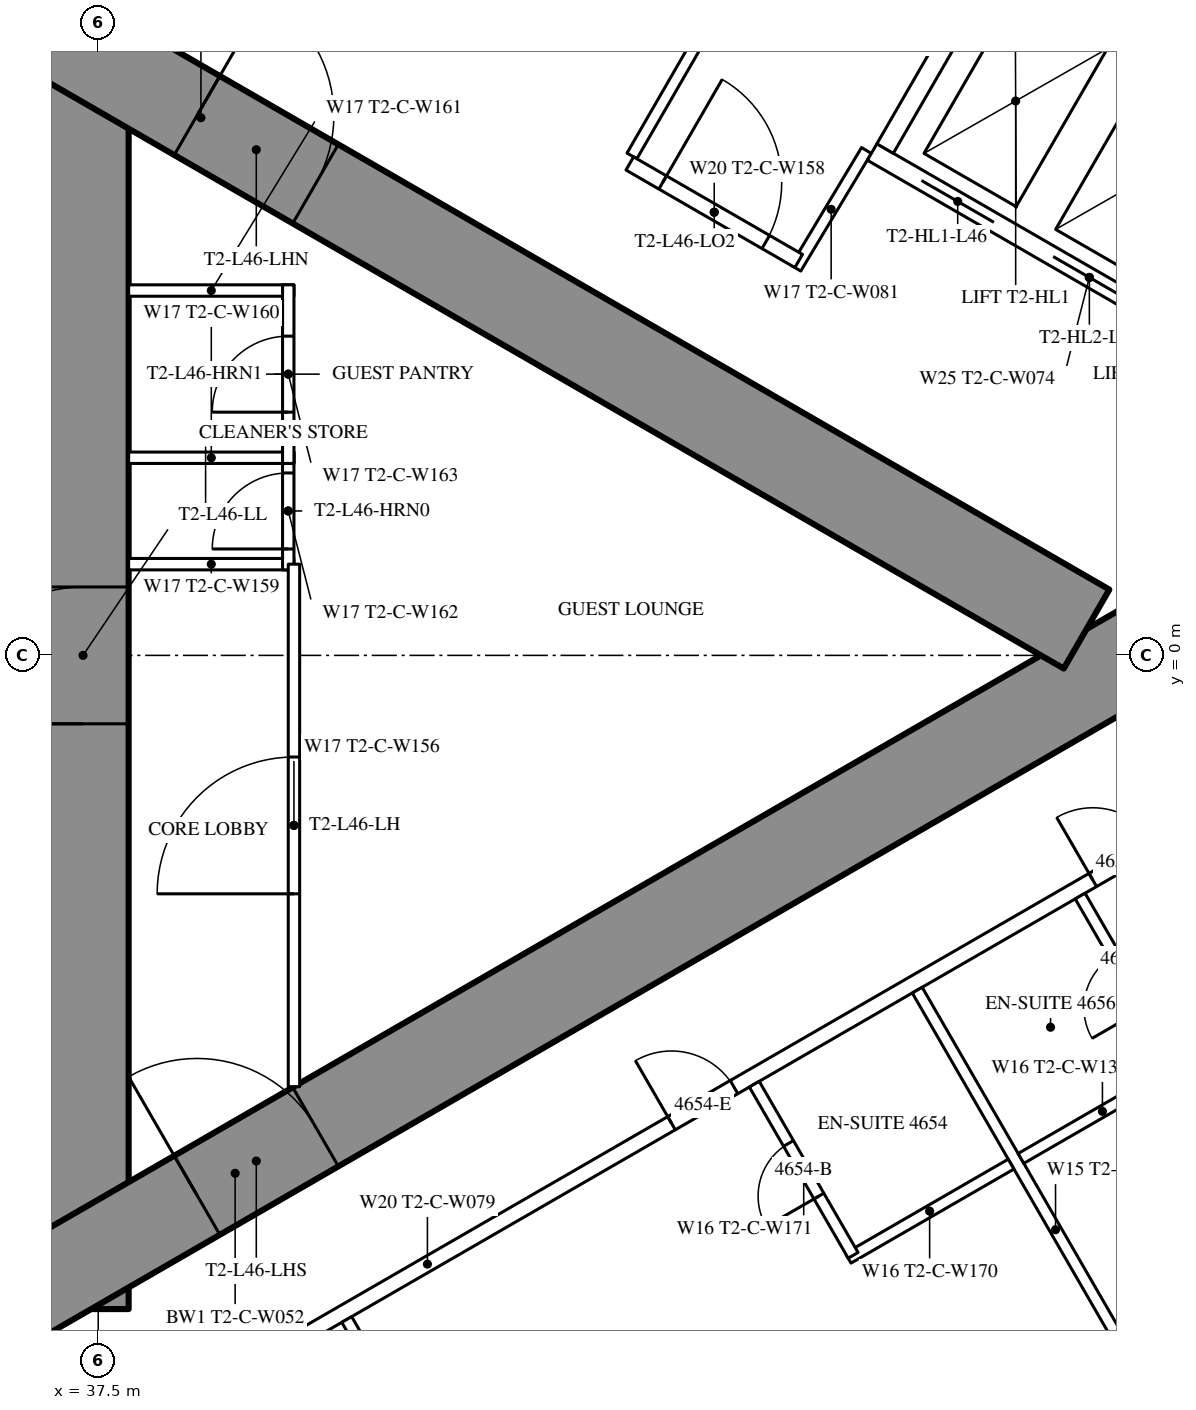
"""IFC4 building model, lengths in metres.
Left out: names, types, materials, properties, quantities, classifications, styles, units other than length and angle.
Written with IfcOpenShell. Run it as: python <this file> out.ifc"""

import sys

from ifc_helpers import new_model, si_unit, direction, frame, frame_2d, origin, place, context, subcontext, project, spatial, rectangle, extrude, element, fill, save


model = new_model("IFC4")
c1 = context("Model", 3, precision=1e-05, world=origin(), true_north=direction((0.0, 1.0)))
c2 = subcontext(c1, "Body", "Model", "MODEL_VIEW")
j1 = project(units=[si_unit("LENGTHUNIT", "METRE"), si_unit("PLANEANGLEUNIT", "RADIAN")], contexts=[c1])
p1 = place(None, origin())
s1 = spatial("IfcSite", under=j1, at=p1, CompositionType="ELEMENT")
p2 = place(p1, origin())
s2 = spatial("IfcBuilding", under=s1, at=p2, CompositionType="ELEMENT")
p3 = place(p2, frame((0.0, 0.0, 173.8)))
s3 = spatial("IfcBuildingStorey", under=s2, at=p3, CompositionType="ELEMENT", Elevation=173.8)
p4 = place(p3, frame((37.3, -8.6, 0.0), z_axis=(0.0, 0.0, 1.0), x_axis=(0.0, 1.0, 0.0)))
e1 = element("IfcWall", 1, at=p4, inside=s3, PredefinedType="SHEAR", context=c2, shape_type="SweptSolid", body=[
    extrude(rectangle(XDim=17.2, YDim=1.2, at=frame_2d((8.6, 0.0))), origin(), (0.0, 0.0, 1.0), 3.5),
])
p5 = place(p4, frame((7.7, 0.0, 0.0)))
e2 = element("IfcOpeningElement", 2, at=p5, cuts=e1, PredefinedType="OPENING", context=c2, shape_type="SweptSolid", body=[
    extrude(rectangle(XDim=1.8, YDim=2.2, at=frame_2d((0.9, 1.1))), frame((0.0, 0.61, 0.0), z_axis=(0.0, -1.0, 0.0), x_axis=(1.0, 0.0, 0.0)), (0.0, 0.0, 1.0), 1.22),
])
p6 = place(p3, frame((27.2, -13.8, 0.0), z_axis=(0.0, 0.0, 1.0), x_axis=(0.866027159892, 0.499996958321, 0.0)))
e3 = element("IfcWall", 3, at=p6, inside=s3, PredefinedType="SHEAR", context=c2, shape_type="SweptSolid", body=[
    extrude(rectangle(XDim=27.947, YDim=1.2, at=frame_2d((13.973, 0.0))), origin(), (0.0, 0.0, 1.0), 3.5),
])
p7 = place(p6, frame((4.6, 0.0, 0.0)))
e4 = element("IfcOpeningElement", 4, at=p7, cuts=e3, PredefinedType="OPENING", context=c2, shape_type="SweptSolid", body=[
    extrude(rectangle(XDim=1.0, YDim=2.2, at=frame_2d((0.5, 1.1))), frame((0.0, 0.61, 0.0), z_axis=(0.0, -1.0, 0.0), x_axis=(1.0, 0.0, 0.0)), (0.0, 0.0, 1.0), 1.22),
])
p8 = place(p6, frame((13.395, 0.0, 0.0)))
e5 = element("IfcOpeningElement", 5, at=p8, cuts=e3, PredefinedType="OPENING", context=c2, shape_type="SweptSolid", body=[
    extrude(rectangle(XDim=1.8, YDim=2.2, at=frame_2d((0.9, 1.1))), frame((0.0, 0.61, 0.0), z_axis=(0.0, -1.0, 0.0), x_axis=(1.0, 0.0, 0.0)), (0.0, 0.0, 1.0), 1.22),
])
p9 = place(p3, frame((27.2, 13.8, 0.0), z_axis=(0.0, 0.0, 1.0), x_axis=(0.866024515034, -0.500001539357, 0.0)))
e6 = element("IfcWall", 6, at=p9, inside=s3, PredefinedType="SHEAR", context=c2, shape_type="SweptSolid", body=[
    extrude(rectangle(XDim=26.907, YDim=1.2, at=frame_2d((13.454, 0.0))), origin(), (0.0, 0.0, 1.0), 3.5),
])
p10 = place(p9, frame((4.6, 0.0, 0.0)))
e7 = element("IfcOpeningElement", 7, at=p10, cuts=e6, PredefinedType="OPENING", context=c2, shape_type="SweptSolid", body=[
    extrude(rectangle(XDim=1.0, YDim=2.2, at=frame_2d((0.5, 1.1))), frame((0.0, 0.61, 0.0), z_axis=(0.0, -1.0, 0.0), x_axis=(1.0, 0.0, 0.0)), (0.0, 0.0, 1.0), 1.22),
])
p11 = place(p9, frame((13.395, 0.0, 0.0)))
e8 = element("IfcOpeningElement", 8, at=p11, cuts=e6, PredefinedType="OPENING", context=c2, shape_type="SweptSolid", body=[
    extrude(rectangle(XDim=1.8, YDim=2.2, at=frame_2d((0.9, 1.1))), frame((0.0, 0.61, 0.0), z_axis=(0.0, -1.0, 0.0), x_axis=(1.0, 0.0, 0.0)), (0.0, 0.0, 1.0), 1.22),
])
p12 = place(p3, frame((27.959, -16.017, 0.0), z_axis=(0.0, 0.0, 1.0), x_axis=(0.866024151371, 0.500002169237, 0.0)))
e9 = element("IfcWall", 9, at=p12, inside=s3, PredefinedType="PARTITIONING", context=c2, shape_type="SweptSolid", body=[
    extrude(rectangle(XDim=32.034, YDim=0.2, at=frame_2d((16.017, 0.0))), origin(), (0.0, 0.0, 1.0), 3.25),
])
p13 = place(p12, frame((4.765, 0.0, 0.0)))
e10 = element("IfcOpeningElement", 10, at=p13, cuts=e9, PredefinedType="OPENING", context=c2, shape_type="SweptSolid", body=[
    extrude(rectangle(XDim=0.95, YDim=2.2, at=frame_2d((0.475, 1.1))), frame((0.0, 0.11, 0.0), z_axis=(0.0, -1.0, 0.0), x_axis=(1.0, 0.0, 0.0)), (0.0, 0.0, 1.0), 0.22),
])
p14 = place(p12, frame((9.215, 0.0, 0.0)))
e11 = element("IfcOpeningElement", 11, at=p14, cuts=e9, PredefinedType="OPENING", context=c2, shape_type="SweptSolid", body=[
    extrude(rectangle(XDim=1.0, YDim=2.2, at=frame_2d((0.5, 1.1))), frame((0.0, 0.11, 0.0), z_axis=(0.0, -1.0, 0.0), x_axis=(1.0, 0.0, 0.0)), (0.0, 0.0, 1.0), 0.22),
])
p15 = place(p12, frame((19.725, 0.0, 0.0)))
e12 = element("IfcOpeningElement", 12, at=p15, cuts=e9, PredefinedType="OPENING", context=c2, shape_type="SweptSolid", body=[
    extrude(rectangle(XDim=0.95, YDim=2.2, at=frame_2d((0.475, 1.1))), frame((0.0, 0.11, 0.0), z_axis=(0.0, -1.0, 0.0), x_axis=(1.0, 0.0, 0.0)), (0.0, 0.0, 1.0), 0.22),
])
p16 = place(p12, frame((26.125, 0.0, 0.0)))
e13 = element("IfcOpeningElement", 13, at=p16, cuts=e9, PredefinedType="OPENING", context=c2, shape_type="SweptSolid", body=[
    extrude(rectangle(XDim=0.95, YDim=2.2, at=frame_2d((0.475, 1.1))), frame((0.0, 0.11, 0.0), z_axis=(0.0, -1.0, 0.0), x_axis=(1.0, 0.0, 0.0)), (0.0, 0.0, 1.0), 0.22),
])
p17 = place(p12, frame((28.106, 0.0, 0.0)))
e14 = element("IfcOpeningElement", 14, at=p17, cuts=e9, PredefinedType="OPENING", context=c2, shape_type="SweptSolid", body=[
    extrude(rectangle(XDim=0.95, YDim=2.2, at=frame_2d((0.475, 1.1))), frame((0.0, 0.11, 0.0), z_axis=(0.0, -1.0, 0.0), x_axis=(1.0, 0.0, 0.0)), (0.0, 0.0, 1.0), 0.22),
])
p18 = place(p3, frame((40.769, -8.737, 0.0), z_axis=(0.0, 0.0, 1.0), x_axis=(0.500013115284, -0.866017831539, 0.0)))
e15 = element("IfcWall", 15, at=p18, inside=s3, PredefinedType="PARTITIONING", context=c2, shape_type="SweptSolid", body=[
    extrude(rectangle(XDim=7.198, YDim=0.15, at=frame_2d((3.599, 0.0))), origin(), (0.0, 0.0, 1.0), 2.3),
])
p19 = place(p3, frame((48.275, -4.404, 0.0), z_axis=(0.0, 0.0, 1.0), x_axis=(0.500006004368, -0.866021937133, 0.0)))
e16 = element("IfcWall", 16, at=p19, inside=s3, PredefinedType="PARTITIONING", context=c2, shape_type="SweptSolid", body=[
    extrude(rectangle(XDim=7.279, YDim=0.15, at=frame_2d((3.64, 0.0))), origin(), (0.0, 0.0, 1.0), 2.3),
])
p20 = place(p3, frame((44.521, 6.571, 0.0), z_axis=(0.0, 0.0, 1.0), x_axis=(0.500020376429, 0.866013639128, 0.0)))
e17 = element("IfcWall", 17, at=p20, inside=s3, PredefinedType="PARTITIONING", context=c2, shape_type="SweptSolid", body=[
    extrude(rectangle(XDim=7.306, YDim=0.15, at=frame_2d((3.653, 0.0))), origin(), (0.0, 0.0, 1.0), 2.3),
])
p21 = place(p3, frame((47.606, 6.643, 0.0), z_axis=(0.0, 0.0, 1.0), x_axis=(-0.514237157483, -0.857648031458, 0.0)))
e18 = element("IfcWall", 18, at=p21, inside=s3, PredefinedType="PARTITIONING", context=c2, shape_type="SweptSolid", body=[
    extrude(rectangle(XDim=1.805, YDim=0.15, at=frame_2d((0.902, 0.0))), origin(), (0.0, 0.0, 1.0), 3.25),
])
p22 = place(p3, frame((44.493, 6.472, 0.0), z_axis=(0.0, 0.0, 1.0), x_axis=(0.866027140358, -0.499996992154, 0.0)))
e19 = element("IfcWall", 19, at=p22, inside=s3, PredefinedType="PARTITIONING", context=c2, shape_type="SweptSolid", body=[
    extrude(rectangle(XDim=2.566, YDim=0.2, at=frame_2d((1.283, 0.0))), origin(), (0.0, 0.0, 1.0), 3.25),
])
p23 = place(p22, frame((0.5, 0.0, 0.0)))
e20 = element("IfcOpeningElement", 20, at=p23, cuts=e19, PredefinedType="OPENING", context=c2, shape_type="SweptSolid", body=[
    extrude(rectangle(XDim=1.566, YDim=2.2, at=frame_2d((0.783, 1.1))), frame((0.0, 0.11, 0.0), z_axis=(0.0, -1.0, 0.0), x_axis=(1.0, 0.0, 0.0)), (0.0, 0.0, 1.0), 0.22),
])
p24 = place(p3, frame((47.366, -7.93, 0.0), z_axis=(0.0, 0.0, 1.0), x_axis=(0.866031185235, 0.4999899861, 0.0)))
e21 = element("IfcWall", 21, at=p24, inside=s3, PredefinedType="PARTITIONING", context=c2, shape_type="SweptSolid", body=[
    extrude(rectangle(XDim=2.475, YDim=0.15, at=frame_2d((1.238, 0.0))), origin(), (0.0, 0.0, 1.0), 3.25),
])
p25 = place(p3, frame((46.131, -5.641, 0.0), z_axis=(0.0, 0.0, 1.0), x_axis=(0.49997716683, -0.86603858612, 0.0)))
e22 = element("IfcWall", 22, at=p25, inside=s3, PredefinedType="PARTITIONING", context=c2, shape_type="SweptSolid", body=[
    extrude(rectangle(XDim=2.6, YDim=0.15, at=frame_2d((1.3, 0.0))), origin(), (0.0, 0.0, 1.0), 3.25),
])
p26 = place(p25, frame((0.9, 0.0, 0.0)))
e23 = element("IfcOpeningElement", 23, at=p26, cuts=e22, PredefinedType="OPENING", context=c2, shape_type="SweptSolid", body=[
    extrude(rectangle(XDim=0.8, YDim=2.2, at=frame_2d((0.4, 1.1))), frame((0.0, 0.085, 0.0), z_axis=(0.0, -1.0, 0.0), x_axis=(1.0, 0.0, 0.0)), (0.0, 0.0, 1.0), 0.17),
])
p27 = place(p3, frame((49.64, -6.618, 0.0), z_axis=(0.0, 0.0, 1.0), x_axis=(0.866006523861, 0.500032699561, 0.0)))
e24 = element("IfcWall", 24, at=p27, inside=s3, PredefinedType="PARTITIONING", context=c2, shape_type="SweptSolid", body=[
    extrude(rectangle(XDim=2.475, YDim=0.15, at=frame_2d((1.237, 0.0))), origin(), (0.0, 0.0, 1.0), 3.25),
])
p28 = place(p3, frame((50.418, -3.166, 0.0), z_axis=(0.0, 0.0, 1.0), x_axis=(0.499936506574, -0.866062058628, 0.0)))
e25 = element("IfcWall", 25, at=p28, inside=s3, PredefinedType="PARTITIONING", context=c2, shape_type="SweptSolid", body=[
    extrude(rectangle(XDim=2.6, YDim=0.15, at=frame_2d((1.3, 0.0))), origin(), (0.0, 0.0, 1.0), 3.25),
])
p29 = place(p28, frame((0.9, 0.0, 0.0)))
e26 = element("IfcOpeningElement", 26, at=p29, cuts=e25, PredefinedType="OPENING", context=c2, shape_type="SweptSolid", body=[
    extrude(rectangle(XDim=0.8, YDim=2.2, at=frame_2d((0.4, 1.1))), frame((0.0, 0.085, 0.0), z_axis=(0.0, -1.0, 0.0), x_axis=(1.0, 0.0, 0.0)), (0.0, 0.0, 1.0), 0.17),
])
for number, where, z_axis, x_axis in (
    (27, (37.9, 1.2, 0.0), (0.0, 0.0, 1.0), (1.0, 0.0, 0.0)),
    (28, (37.9, 2.6, 0.0), (0.0, 0.0, 1.0), (1.0, 0.0, 0.0)),
    (29, (37.9, 4.8, 0.0), (0.0, 0.0, 1.0), (1.0, 0.0, 0.0)),
):
    element("IfcWall", number, at=place(p3, frame(where, z_axis=z_axis, x_axis=x_axis)), inside=s3, PredefinedType="PARTITIONING", context=c2, shape_type="SweptSolid", body=[
        extrude(rectangle(XDim=2.175, YDim=0.15, at=frame_2d((1.087, 0.0))), origin(), (0.0, 0.0, 1.0), 3.25),
    ])
p30 = place(p3, frame((40.0, 1.125, 0.0), z_axis=(0.0, 0.0, 1.0), x_axis=(0.0, 1.0, 0.0)))
e30 = element("IfcWall", 30, at=p30, inside=s3, PredefinedType="PARTITIONING", context=c2, shape_type="SweptSolid", body=[
    extrude(rectangle(XDim=1.55, YDim=0.15, at=frame_2d((0.775, 0.0))), origin(), (0.0, 0.0, 1.0), 3.25),
])
p31 = place(p30, frame((0.275, 0.0, 0.0)))
e31 = element("IfcOpeningElement", 31, at=p31, cuts=e30, PredefinedType="OPENING", context=c2, shape_type="SweptSolid", body=[
    extrude(rectangle(XDim=1.0, YDim=2.2, at=frame_2d((0.5, 1.1))), frame((0.0, 0.085, 0.0), z_axis=(0.0, -1.0, 0.0), x_axis=(1.0, 0.0, 0.0)), (0.0, 0.0, 1.0), 0.17),
])
p32 = place(p3, frame((40.0, 2.525, 0.0), z_axis=(0.0, 0.0, 1.0), x_axis=(0.0, 1.0, 0.0)))
e32 = element("IfcWall", 32, at=p32, inside=s3, PredefinedType="PARTITIONING", context=c2, shape_type="SweptSolid", body=[
    extrude(rectangle(XDim=2.35, YDim=0.15, at=frame_2d((1.175, 0.0))), origin(), (0.0, 0.0, 1.0), 3.25),
])
p33 = place(p32, frame((0.675, 0.0, 0.0)))
e33 = element("IfcOpeningElement", 33, at=p33, cuts=e32, PredefinedType="OPENING", context=c2, shape_type="SweptSolid", body=[
    extrude(rectangle(XDim=1.0, YDim=2.2, at=frame_2d((0.5, 1.1))), frame((0.0, 0.085, 0.0), z_axis=(0.0, -1.0, 0.0), x_axis=(1.0, 0.0, 0.0)), (0.0, 0.0, 1.0), 0.17),
])
p34 = place(p3, frame((40.075, -5.674, 0.0), z_axis=(0.0, 0.0, 1.0), x_axis=(0.0, 1.0, 0.0)))
e34 = element("IfcWall", 34, at=p34, inside=s3, PredefinedType="PARTITIONING", context=c2, shape_type="SweptSolid", body=[
    extrude(rectangle(XDim=6.874, YDim=0.15, at=frame_2d((3.437, 0.0))), origin(), (0.0, 0.0, 1.0), 3.25),
])
p35 = place(p34, frame((2.537, 0.0, 0.0)))
e35 = element("IfcOpeningElement", 35, at=p35, cuts=e34, PredefinedType="OPENING", context=c2, shape_type="SweptSolid", body=[
    extrude(rectangle(XDim=1.8, YDim=2.2, at=frame_2d((0.9, 1.1))), frame((0.0, 0.085, 0.0), z_axis=(0.0, -1.0, 0.0), x_axis=(1.0, 0.0, 0.0)), (0.0, 0.0, 1.0), 0.17),
])
p36 = place(p3, frame((47.681, 6.622, 0.0), z_axis=(0.0, 0.0, 1.0), x_axis=(0.86603344179, -0.499986077507, 0.0)))
e36 = element("IfcWall", 36, at=p36, inside=s3, PredefinedType="PARTITIONING", context=c2, shape_type="SweptSolid", body=[
    extrude(rectangle(XDim=6.6, YDim=0.25, at=frame_2d((3.3, 0.0))), origin(), (0.0, 0.0, 1.0), 3.25),
])
p37 = place(p36, frame((0.75, 0.0, 0.0)))
e37 = element("IfcOpeningElement", 37, at=p37, cuts=e36, PredefinedType="OPENING", context=c2, shape_type="SweptSolid", body=[
    extrude(rectangle(XDim=1.1, YDim=2.2, at=frame_2d((0.55, 1.1))), frame((0.0, 0.135, 0.0), z_axis=(0.0, -1.0, 0.0), x_axis=(1.0, 0.0, 0.0)), (0.0, 0.0, 1.0), 0.27),
])
p38 = place(p36, frame((2.75, 0.0, 0.0)))
e38 = element("IfcOpeningElement", 38, at=p38, cuts=e36, PredefinedType="OPENING", context=c2, shape_type="SweptSolid", body=[
    extrude(rectangle(XDim=1.1, YDim=2.2, at=frame_2d((0.55, 1.1))), frame((0.0, 0.135, 0.0), z_axis=(0.0, -1.0, 0.0), x_axis=(1.0, 0.0, 0.0)), (0.0, 0.0, 1.0), 0.27),
])
p39 = place(p36, frame((4.75, 0.0, 0.0)))
e39 = element("IfcOpeningElement", 39, at=p39, cuts=e36, PredefinedType="OPENING", context=c2, shape_type="SweptSolid", body=[
    extrude(rectangle(XDim=1.1, YDim=2.2, at=frame_2d((0.55, 1.1))), frame((0.0, 0.135, 0.0), z_axis=(0.0, -1.0, 0.0), x_axis=(1.0, 0.0, 0.0)), (0.0, 0.0, 1.0), 0.27),
])
p40 = place(p3, frame((49.406, 9.611, 0.0), z_axis=(0.0, 0.0, 1.0), x_axis=(0.86603344179, -0.499986077507, 0.0)))
e40 = element("IfcWall", 40, at=p40, inside=s3, PredefinedType="PARTITIONING", context=c2, shape_type="SweptSolid", body=[
    extrude(rectangle(XDim=6.6, YDim=0.25, at=frame_2d((3.3, 0.0))), origin(), (0.0, 0.0, 1.0), 3.25),
])
p41 = place(p3, frame((47.852, 6.668, 0.0), z_axis=(0.0, 0.0, 1.0), x_axis=(0.499929347863, 0.866066190972, 0.0)))
e41 = element("IfcWall", 41, at=p41, inside=s3, PredefinedType="PARTITIONING", context=c2, shape_type="SweptSolid", body=[
    extrude(rectangle(XDim=3.201, YDim=0.25, at=frame_2d((1.6, 0.0))), origin(), (0.0, 0.0, 1.0), 3.25),
])
p42 = place(p26, origin())
e42 = element("IfcDoor", 42, at=p42, inside=s3, OperationType="SINGLE_SWING_RIGHT", PredefinedType="DOOR", context=c2, shape_type="SweptSolid", body=[
    extrude(rectangle(XDim=0.8, YDim=2.2, at=frame_2d((0.4, 1.1))), frame((0.0, 0.025, 0.0), z_axis=(0.0, -1.0, 0.0), x_axis=(1.0, 0.0, 0.0)), (0.0, 0.0, 1.0), 0.05),
])
fill(e23, e42)
p43 = place(p15, origin())
e43 = element("IfcDoor", 43, at=p43, inside=s3, OperationType="SINGLE_SWING_LEFT", PredefinedType="DOOR", context=c2, shape_type="SweptSolid", body=[
    extrude(rectangle(XDim=0.95, YDim=2.2, at=frame_2d((0.475, 1.1))), frame((0.0, 0.025, 0.0), z_axis=(0.0, -1.0, 0.0), x_axis=(1.0, 0.0, 0.0)), (0.0, 0.0, 1.0), 0.05),
])
fill(e12, e43)
p44 = place(p29, origin())
e44 = element("IfcDoor", 44, at=p44, inside=s3, OperationType="SINGLE_SWING_RIGHT", PredefinedType="DOOR", context=c2, shape_type="SweptSolid", body=[
    extrude(rectangle(XDim=0.8, YDim=2.2, at=frame_2d((0.4, 1.1))), frame((0.0, 0.025, 0.0), z_axis=(0.0, -1.0, 0.0), x_axis=(1.0, 0.0, 0.0)), (0.0, 0.0, 1.0), 0.05),
])
fill(e26, e44)
p45 = place(p16, origin())
e45 = element("IfcDoor", 45, at=p45, inside=s3, OperationType="SINGLE_SWING_LEFT", PredefinedType="DOOR", context=c2, shape_type="SweptSolid", body=[
    extrude(rectangle(XDim=0.95, YDim=2.2, at=frame_2d((0.475, 1.1))), frame((0.0, 0.025, 0.0), z_axis=(0.0, -1.0, 0.0), x_axis=(1.0, 0.0, 0.0)), (0.0, 0.0, 1.0), 0.05),
])
fill(e13, e45)
p46 = place(p23, origin())
e46 = element("IfcDoor", 46, at=p46, inside=s3, OperationType="SINGLE_SWING_LEFT", PredefinedType="DOOR", context=c2, shape_type="SweptSolid", body=[
    extrude(rectangle(XDim=1.566, YDim=2.2, at=frame_2d((0.783, 1.1))), frame((0.0, 0.025, 0.0), z_axis=(0.0, -1.0, 0.0), x_axis=(1.0, 0.0, 0.0)), (0.0, 0.0, 1.0), 0.05),
])
fill(e20, e46)
p47 = place(p31, origin())
e47 = element("IfcDoor", 47, at=p47, inside=s3, OperationType="SINGLE_SWING_LEFT", PredefinedType="DOOR", context=c2, shape_type="SweptSolid", body=[
    extrude(rectangle(XDim=1.0, YDim=2.2, at=frame_2d((0.5, 1.1))), frame((0.0, 0.025, 0.0), z_axis=(0.0, -1.0, 0.0), x_axis=(1.0, 0.0, 0.0)), (0.0, 0.0, 1.0), 0.05),
])
fill(e31, e47)
p48 = place(p33, origin())
e48 = element("IfcDoor", 48, at=p48, inside=s3, OperationType="SINGLE_SWING_LEFT", PredefinedType="DOOR", context=c2, shape_type="SweptSolid", body=[
    extrude(rectangle(XDim=1.0, YDim=2.2, at=frame_2d((0.5, 1.1))), frame((0.0, 0.025, 0.0), z_axis=(0.0, -1.0, 0.0), x_axis=(1.0, 0.0, 0.0)), (0.0, 0.0, 1.0), 0.05),
])
fill(e33, e48)
p49 = place(p35, origin())
e49 = element("IfcDoor", 49, at=p49, inside=s3, OperationType="DOUBLE_DOOR_SINGLE_SWING", PredefinedType="DOOR", context=c2, shape_type="SweptSolid", body=[
    extrude(rectangle(XDim=1.8, YDim=2.2, at=frame_2d((0.9, 1.1))), frame((0.0, 0.025, 0.0), z_axis=(0.0, -1.0, 0.0), x_axis=(1.0, 0.0, 0.0)), (0.0, 0.0, 1.0), 0.05),
])
fill(e35, e49)
p50 = place(p8, origin())
e50 = element("IfcDoor", 50, at=p50, inside=s3, OperationType="DOUBLE_DOOR_SINGLE_SWING", PredefinedType="DOOR", context=c2, shape_type="SweptSolid", body=[
    extrude(rectangle(XDim=1.8, YDim=2.2, at=frame_2d((0.9, 1.1))), frame((0.0, 0.025, 0.0), z_axis=(0.0, -1.0, 0.0), x_axis=(1.0, 0.0, 0.0)), (0.0, 0.0, 1.0), 0.05),
])
fill(e5, e50)
p51 = place(p11, origin())
e51 = element("IfcDoor", 51, at=p51, inside=s3, OperationType="DOUBLE_DOOR_SINGLE_SWING", PredefinedType="DOOR", context=c2, shape_type="SweptSolid", body=[
    extrude(rectangle(XDim=1.8, YDim=2.2, at=frame_2d((0.9, 1.1))), frame((0.0, 0.025, 0.0), z_axis=(0.0, -1.0, 0.0), x_axis=(1.0, 0.0, 0.0)), (0.0, 0.0, 1.0), 0.05),
])
fill(e8, e51)
p52 = place(p5, origin())
e52 = element("IfcDoor", 52, at=p52, inside=s3, OperationType="DOUBLE_DOOR_SINGLE_SWING", PredefinedType="DOOR", context=c2, shape_type="SweptSolid", body=[
    extrude(rectangle(XDim=1.8, YDim=2.2, at=frame_2d((0.9, 1.1))), frame((0.0, 0.025, 0.0), z_axis=(0.0, -1.0, 0.0), x_axis=(1.0, 0.0, 0.0)), (0.0, 0.0, 1.0), 0.05),
])
fill(e2, e52)
p53 = place(p37, origin())
e53 = element("IfcDoor", 53, at=p53, inside=s3, OperationType="DOUBLE_DOOR_SLIDING", PredefinedType="USERDEFINED", context=c2, shape_type="SweptSolid", body=[
    extrude(rectangle(XDim=1.1, YDim=2.2, at=frame_2d((0.55, 1.1))), frame((0.0, 0.025, 0.0), z_axis=(0.0, -1.0, 0.0), x_axis=(1.0, 0.0, 0.0)), (0.0, 0.0, 1.0), 0.05),
])
fill(e37, e53)
p54 = place(p38, origin())
e54 = element("IfcDoor", 54, at=p54, inside=s3, OperationType="DOUBLE_DOOR_SLIDING", PredefinedType="USERDEFINED", context=c2, shape_type="SweptSolid", body=[
    extrude(rectangle(XDim=1.1, YDim=2.2, at=frame_2d((0.55, 1.1))), frame((0.0, 0.025, 0.0), z_axis=(0.0, -1.0, 0.0), x_axis=(1.0, 0.0, 0.0)), (0.0, 0.0, 1.0), 0.05),
])
fill(e38, e54)
save(model, sys.argv[1])
